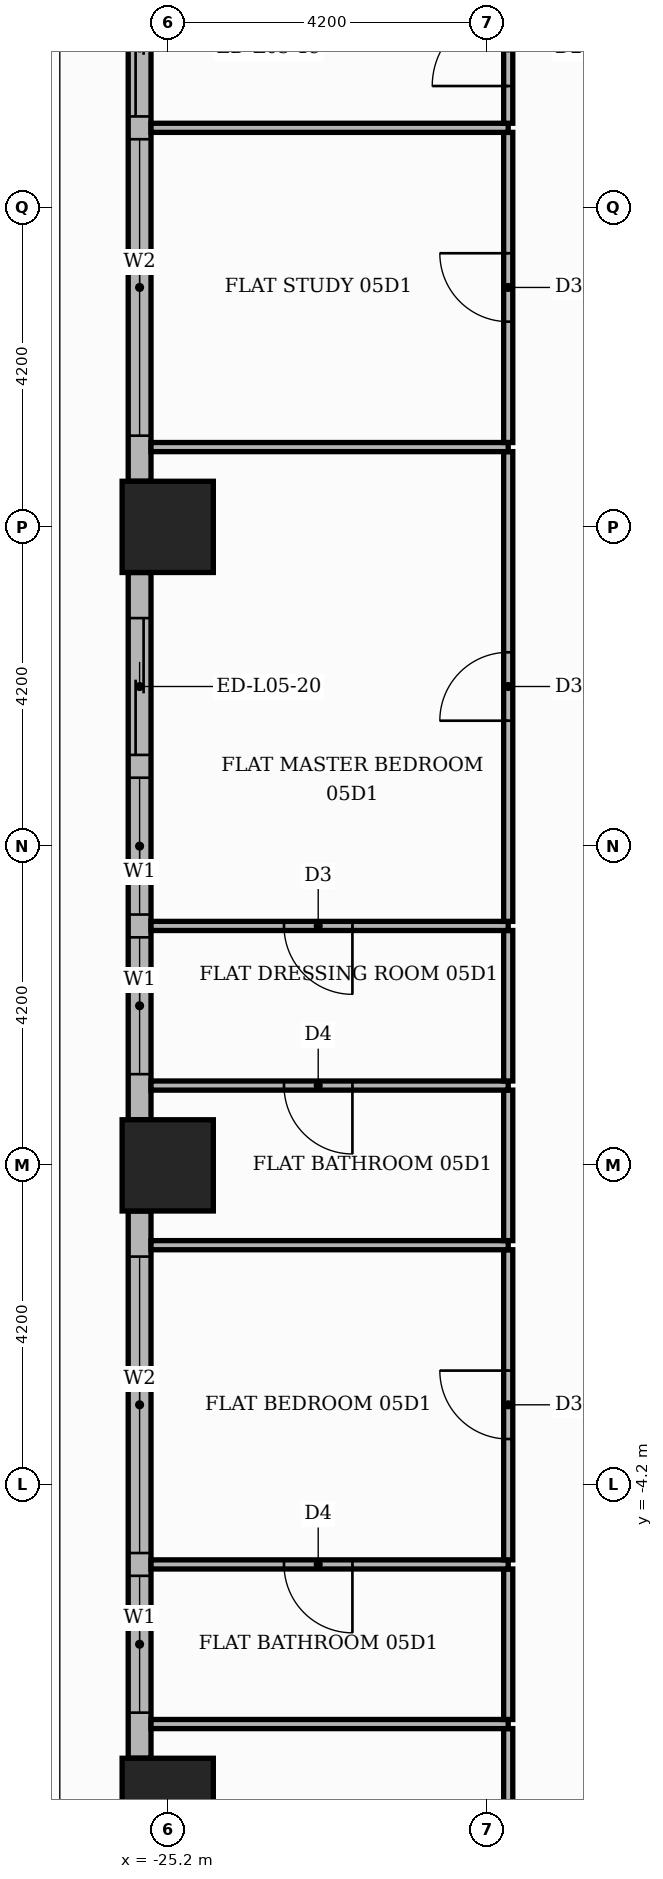
"""IFC4 building model, lengths in metres.
Left out: names, types, materials, properties, quantities, classifications, styles, units other than length and angle.
Written with IfcOpenShell. Run it as: python <this file> out.ifc"""

import sys

from ifc_helpers import new_model, si_unit, direction, frame, frame_2d, origin, origin_2d, place, context, subcontext, project, spatial, rectangle, extrude, element, fill, save


model = new_model("IFC4")
c1 = context("Model", 3, precision=1e-05, world=origin(), true_north=direction((0.0, 1.0)))
c2 = subcontext(c1, "Body", "Model", "MODEL_VIEW")
j1 = project(units=[si_unit("LENGTHUNIT", "METRE"), si_unit("PLANEANGLEUNIT", "RADIAN")], contexts=[c1])
p1 = place(None, origin())
s1 = spatial("IfcSite", under=j1, at=p1, CompositionType="ELEMENT")
p2 = place(p1, origin())
s2 = spatial("IfcBuilding", under=s1, at=p2, CompositionType="ELEMENT")
p3 = place(p2, frame((0.0, 0.0, 27.0)))
s3 = spatial("IfcBuildingStorey", under=s2, at=p3, CompositionType="ELEMENT", Elevation=27.0)
for number, where, z_axis, x_axis in (
    (1, (-25.2, 0.0, 0.0), (0.0, 0.0, 1.0), (1.0, 0.0, 0.0)),
    (2, (-25.2, -8.4, 0.0), (0.0, 0.0, 1.0), (1.0, 0.0, 0.0)),
    (3, (-25.2, 8.4, 0.0), (0.0, 0.0, 1.0), (1.0, 0.0, 0.0)),
):
    element("IfcColumn", number, at=place(p3, frame(where, z_axis=z_axis, x_axis=x_axis)), inside=s3, PredefinedType="COLUMN", context=c2, shape_type="SweptSolid", body=[
        extrude(rectangle(XDim=1.2, YDim=1.2, at=origin_2d()), origin(), (0.0, 0.0, 1.0), 3.9),
    ])
p4 = place(p3, frame((-25.57, 16.2, 0.0), z_axis=(0.0, 0.0, 1.0), x_axis=(0.0, -1.0, 0.0)))
e4 = element("IfcWall", 4, at=p4, inside=s3, PredefinedType="STANDARD", context=c2, shape_type="SweptSolid", body=[
    extrude(rectangle(XDim=7.2, YDim=0.3, at=frame_2d((3.6, 0.0))), origin(), (0.0, 0.0, 1.0), 3.48),
])
p5 = place(p4, frame((0.6, 0.0, 0.0)))
e5 = element("IfcOpeningElement", 5, at=p5, cuts=e4, PredefinedType="OPENING", context=c2, shape_type="SweptSolid", body=[
    extrude(rectangle(XDim=1.8, YDim=2.4, at=frame_2d((0.9, 1.2))), frame((0.0, 0.16, 0.0), z_axis=(0.0, -1.0, 0.0), x_axis=(1.0, 0.0, 0.0)), (0.0, 0.0, 1.0), 0.32),
])
p6 = place(p4, frame((2.7, 0.0, 0.9)))
e6 = element("IfcOpeningElement", 6, at=p6, cuts=e4, PredefinedType="OPENING", context=c2, shape_type="SweptSolid", body=[
    extrude(rectangle(XDim=3.9, YDim=2.1, at=frame_2d((1.95, 1.05))), frame((0.0, 0.16, 0.0), z_axis=(0.0, -1.0, 0.0), x_axis=(1.0, 0.0, 0.0)), (0.0, 0.0, 1.0), 0.32),
])
p7 = place(p3, frame((-25.57, 7.8, 0.0), z_axis=(0.0, 0.0, 1.0), x_axis=(0.0, -1.0, 0.0)))
e7 = element("IfcWall", 7, at=p7, inside=s3, PredefinedType="STANDARD", context=c2, shape_type="SweptSolid", body=[
    extrude(rectangle(XDim=7.2, YDim=0.3, at=frame_2d((3.6, 0.0))), origin(), (0.0, 0.0, 1.0), 3.48),
])
p8 = place(p7, frame((0.6, 0.0, 0.0)))
e8 = element("IfcOpeningElement", 8, at=p8, cuts=e7, PredefinedType="OPENING", context=c2, shape_type="SweptSolid", body=[
    extrude(rectangle(XDim=1.8, YDim=2.4, at=frame_2d((0.9, 1.2))), frame((0.0, 0.16, 0.0), z_axis=(0.0, -1.0, 0.0), x_axis=(1.0, 0.0, 0.0)), (0.0, 0.0, 1.0), 0.32),
])
p9 = place(p7, frame((2.7, 0.0, 0.9)))
e9 = element("IfcOpeningElement", 9, at=p9, cuts=e7, PredefinedType="OPENING", context=c2, shape_type="SweptSolid", body=[
    extrude(rectangle(XDim=1.8, YDim=2.1, at=frame_2d((0.9, 1.05))), frame((0.0, 0.16, 0.0), z_axis=(0.0, -1.0, 0.0), x_axis=(1.0, 0.0, 0.0)), (0.0, 0.0, 1.0), 0.32),
])
p10 = place(p7, frame((4.8, 0.0, 0.9)))
e10 = element("IfcOpeningElement", 10, at=p10, cuts=e7, PredefinedType="OPENING", context=c2, shape_type="SweptSolid", body=[
    extrude(rectangle(XDim=1.8, YDim=2.1, at=frame_2d((0.9, 1.05))), frame((0.0, 0.16, 0.0), z_axis=(0.0, -1.0, 0.0), x_axis=(1.0, 0.0, 0.0)), (0.0, 0.0, 1.0), 0.32),
])
p11 = place(p3, frame((-25.57, -0.6, 0.0), z_axis=(0.0, 0.0, 1.0), x_axis=(0.0, -1.0, 0.0)))
e11 = element("IfcWall", 11, at=p11, inside=s3, PredefinedType="STANDARD", context=c2, shape_type="SweptSolid", body=[
    extrude(rectangle(XDim=7.2, YDim=0.3, at=frame_2d((3.6, 0.0))), origin(), (0.0, 0.0, 1.0), 3.48),
])
p12 = place(p11, frame((0.6, 0.0, 0.9)))
e12 = element("IfcOpeningElement", 12, at=p12, cuts=e11, PredefinedType="OPENING", context=c2, shape_type="SweptSolid", body=[
    extrude(rectangle(XDim=3.9, YDim=2.1, at=frame_2d((1.95, 1.05))), frame((0.0, 0.16, 0.0), z_axis=(0.0, -1.0, 0.0), x_axis=(1.0, 0.0, 0.0)), (0.0, 0.0, 1.0), 0.32),
])
p13 = place(p11, frame((4.8, 0.0, 0.9)))
e13 = element("IfcOpeningElement", 13, at=p13, cuts=e11, PredefinedType="OPENING", context=c2, shape_type="SweptSolid", body=[
    extrude(rectangle(XDim=1.8, YDim=2.1, at=frame_2d((0.9, 1.05))), frame((0.0, 0.16, 0.0), z_axis=(0.0, -1.0, 0.0), x_axis=(1.0, 0.0, 0.0)), (0.0, 0.0, 1.0), 0.32),
])
p14 = place(p3, frame((-20.72, -11.49, 0.0), z_axis=(0.0, 0.0, 1.0), x_axis=(0.0, 1.0, 0.0)))
e14 = element("IfcWall", 14, at=p14, inside=s3, PredefinedType="PARTITIONING", context=c2, shape_type="SweptSolid", body=[
    extrude(rectangle(XDim=4.08, YDim=0.12, at=frame_2d((2.04, 0.0))), origin(), (0.0, 0.0, 1.0), 3.48),
])
p15 = place(p14, frame((1.59, 0.0, 0.0)))
e15 = element("IfcOpeningElement", 15, at=p15, cuts=e14, PredefinedType="OPENING", context=c2, shape_type="SweptSolid", body=[
    extrude(rectangle(XDim=0.9, YDim=2.1, at=frame_2d((0.45, 1.05))), frame((0.0, 0.07, 0.0), z_axis=(0.0, -1.0, 0.0), x_axis=(1.0, 0.0, 0.0)), (0.0, 0.0, 1.0), 0.14),
])
p16 = place(p3, frame((-25.42, -7.35, 0.0), z_axis=(0.0, 0.0, 1.0), x_axis=(1.0, 0.0, 0.0)))
e16 = element("IfcWall", 16, at=p16, inside=s3, PredefinedType="PARTITIONING", context=c2, shape_type="SweptSolid", body=[
    extrude(rectangle(XDim=4.7, YDim=0.12, at=frame_2d((2.35, 0.0))), origin(), (0.0, 0.0, 1.0), 3.48),
])
p17 = place(p3, frame((-20.72, -7.29, 0.0), z_axis=(0.0, 0.0, 1.0), x_axis=(0.0, 1.0, 0.0)))
e17 = element("IfcWall", 17, at=p17, inside=s3, PredefinedType="PARTITIONING", context=c2, shape_type="SweptSolid", body=[
    extrude(rectangle(XDim=1.98, YDim=0.12, at=frame_2d((0.99, 0.0))), origin(), (0.0, 0.0, 1.0), 3.48),
])
p18 = place(p3, frame((-25.42, -5.25, 0.0), z_axis=(0.0, 0.0, 1.0), x_axis=(1.0, 0.0, 0.0)))
e18 = element("IfcWall", 18, at=p18, inside=s3, PredefinedType="PARTITIONING", context=c2, shape_type="SweptSolid", body=[
    extrude(rectangle(XDim=4.7, YDim=0.12, at=frame_2d((2.35, 0.0))), origin(), (0.0, 0.0, 1.0), 3.48),
])
p19 = place(p18, frame((1.75, 0.0, 0.0)))
e19 = element("IfcOpeningElement", 19, at=p19, cuts=e18, PredefinedType="OPENING", context=c2, shape_type="SweptSolid", body=[
    extrude(rectangle(XDim=0.9, YDim=2.1, at=frame_2d((0.45, 1.05))), frame((0.0, 0.07, 0.0), z_axis=(0.0, -1.0, 0.0), x_axis=(1.0, 0.0, 0.0)), (0.0, 0.0, 1.0), 0.14),
])
p20 = place(p3, frame((-20.72, -5.19, 0.0), z_axis=(0.0, 0.0, 1.0), x_axis=(0.0, 1.0, 0.0)))
e20 = element("IfcWall", 20, at=p20, inside=s3, PredefinedType="PARTITIONING", context=c2, shape_type="SweptSolid", body=[
    extrude(rectangle(XDim=4.08, YDim=0.12, at=frame_2d((2.04, 0.0))), origin(), (0.0, 0.0, 1.0), 3.48),
])
p21 = place(p20, frame((1.59, 0.0, 0.0)))
e21 = element("IfcOpeningElement", 21, at=p21, cuts=e20, PredefinedType="OPENING", context=c2, shape_type="SweptSolid", body=[
    extrude(rectangle(XDim=0.9, YDim=2.1, at=frame_2d((0.45, 1.05))), frame((0.0, 0.07, 0.0), z_axis=(0.0, -1.0, 0.0), x_axis=(1.0, 0.0, 0.0)), (0.0, 0.0, 1.0), 0.14),
])
p22 = place(p3, frame((-25.42, -1.05, 0.0), z_axis=(0.0, 0.0, 1.0), x_axis=(1.0, 0.0, 0.0)))
e22 = element("IfcWall", 22, at=p22, inside=s3, PredefinedType="PARTITIONING", context=c2, shape_type="SweptSolid", body=[
    extrude(rectangle(XDim=4.7, YDim=0.12, at=frame_2d((2.35, 0.0))), origin(), (0.0, 0.0, 1.0), 3.48),
])
p23 = place(p3, frame((-20.72, -0.99, 0.0), z_axis=(0.0, 0.0, 1.0), x_axis=(0.0, 1.0, 0.0)))
e23 = element("IfcWall", 23, at=p23, inside=s3, PredefinedType="PARTITIONING", context=c2, shape_type="SweptSolid", body=[
    extrude(rectangle(XDim=1.98, YDim=0.12, at=frame_2d((0.99, 0.0))), origin(), (0.0, 0.0, 1.0), 3.48),
])
p24 = place(p3, frame((-25.42, 1.05, 0.0), z_axis=(0.0, 0.0, 1.0), x_axis=(1.0, 0.0, 0.0)))
e24 = element("IfcWall", 24, at=p24, inside=s3, PredefinedType="PARTITIONING", context=c2, shape_type="SweptSolid", body=[
    extrude(rectangle(XDim=4.7, YDim=0.12, at=frame_2d((2.35, 0.0))), origin(), (0.0, 0.0, 1.0), 3.48),
])
p25 = place(p24, frame((1.75, 0.0, 0.0)))
e25 = element("IfcOpeningElement", 25, at=p25, cuts=e24, PredefinedType="OPENING", context=c2, shape_type="SweptSolid", body=[
    extrude(rectangle(XDim=0.9, YDim=2.1, at=frame_2d((0.45, 1.05))), frame((0.0, 0.07, 0.0), z_axis=(0.0, -1.0, 0.0), x_axis=(1.0, 0.0, 0.0)), (0.0, 0.0, 1.0), 0.14),
])
p26 = place(p3, frame((-20.72, 1.11, 0.0), z_axis=(0.0, 0.0, 1.0), x_axis=(0.0, 1.0, 0.0)))
e26 = element("IfcWall", 26, at=p26, inside=s3, PredefinedType="PARTITIONING", context=c2, shape_type="SweptSolid", body=[
    extrude(rectangle(XDim=1.98, YDim=0.12, at=frame_2d((0.99, 0.0))), origin(), (0.0, 0.0, 1.0), 3.48),
])
p27 = place(p3, frame((-25.42, 3.15, 0.0), z_axis=(0.0, 0.0, 1.0), x_axis=(1.0, 0.0, 0.0)))
e27 = element("IfcWall", 27, at=p27, inside=s3, PredefinedType="PARTITIONING", context=c2, shape_type="SweptSolid", body=[
    extrude(rectangle(XDim=4.7, YDim=0.12, at=frame_2d((2.35, 0.0))), origin(), (0.0, 0.0, 1.0), 3.48),
])
p28 = place(p27, frame((1.75, 0.0, 0.0)))
e28 = element("IfcOpeningElement", 28, at=p28, cuts=e27, PredefinedType="OPENING", context=c2, shape_type="SweptSolid", body=[
    extrude(rectangle(XDim=0.9, YDim=2.1, at=frame_2d((0.45, 1.05))), frame((0.0, 0.07, 0.0), z_axis=(0.0, -1.0, 0.0), x_axis=(1.0, 0.0, 0.0)), (0.0, 0.0, 1.0), 0.14),
])
p29 = place(p3, frame((-20.72, 3.21, 0.0), z_axis=(0.0, 0.0, 1.0), x_axis=(0.0, 1.0, 0.0)))
e29 = element("IfcWall", 29, at=p29, inside=s3, PredefinedType="PARTITIONING", context=c2, shape_type="SweptSolid", body=[
    extrude(rectangle(XDim=6.18, YDim=0.12, at=frame_2d((3.09, 0.0))), origin(), (0.0, 0.0, 1.0), 3.48),
])
p30 = place(p29, frame((2.64, 0.0, 0.0)))
e30 = element("IfcOpeningElement", 30, at=p30, cuts=e29, PredefinedType="OPENING", context=c2, shape_type="SweptSolid", body=[
    extrude(rectangle(XDim=0.9, YDim=2.1, at=frame_2d((0.45, 1.05))), frame((0.0, 0.07, 0.0), z_axis=(0.0, -1.0, 0.0), x_axis=(1.0, 0.0, 0.0)), (0.0, 0.0, 1.0), 0.14),
])
p31 = place(p3, frame((-25.42, 9.45, 0.0), z_axis=(0.0, 0.0, 1.0), x_axis=(1.0, 0.0, 0.0)))
e31 = element("IfcWall", 31, at=p31, inside=s3, PredefinedType="PARTITIONING", context=c2, shape_type="SweptSolid", body=[
    extrude(rectangle(XDim=4.7, YDim=0.12, at=frame_2d((2.35, 0.0))), origin(), (0.0, 0.0, 1.0), 3.48),
])
p32 = place(p3, frame((-20.72, 9.51, 0.0), z_axis=(0.0, 0.0, 1.0), x_axis=(0.0, 1.0, 0.0)))
e32 = element("IfcWall", 32, at=p32, inside=s3, PredefinedType="PARTITIONING", context=c2, shape_type="SweptSolid", body=[
    extrude(rectangle(XDim=4.08, YDim=0.12, at=frame_2d((2.04, 0.0))), origin(), (0.0, 0.0, 1.0), 3.48),
])
p33 = place(p32, frame((1.59, 0.0, 0.0)))
e33 = element("IfcOpeningElement", 33, at=p33, cuts=e32, PredefinedType="OPENING", context=c2, shape_type="SweptSolid", body=[
    extrude(rectangle(XDim=0.9, YDim=2.1, at=frame_2d((0.45, 1.05))), frame((0.0, 0.07, 0.0), z_axis=(0.0, -1.0, 0.0), x_axis=(1.0, 0.0, 0.0)), (0.0, 0.0, 1.0), 0.14),
])
p34 = place(p3, frame((-25.42, 13.65, 0.0), z_axis=(0.0, 0.0, 1.0), x_axis=(1.0, 0.0, 0.0)))
e34 = element("IfcWall", 34, at=p34, inside=s3, PredefinedType="PARTITIONING", context=c2, shape_type="SweptSolid", body=[
    extrude(rectangle(XDim=4.7, YDim=0.12, at=frame_2d((2.35, 0.0))), origin(), (0.0, 0.0, 1.0), 3.48),
])
p35 = place(p3, frame((-20.72, 13.71, 0.0), z_axis=(0.0, 0.0, 1.0), x_axis=(0.0, 1.0, 0.0)))
e35 = element("IfcWall", 35, at=p35, inside=s3, PredefinedType="PARTITIONING", context=c2, shape_type="SweptSolid", body=[
    extrude(rectangle(XDim=1.98, YDim=0.12, at=frame_2d((0.99, 0.0))), origin(), (0.0, 0.0, 1.0), 3.48),
])
p36 = place(p35, frame((0.49, 0.0, 0.0)))
e36 = element("IfcOpeningElement", 36, at=p36, cuts=e35, PredefinedType="OPENING", context=c2, shape_type="SweptSolid", body=[
    extrude(rectangle(XDim=1.0, YDim=2.1, at=frame_2d((0.5, 1.05))), frame((0.0, 0.07, 0.0), z_axis=(0.0, -1.0, 0.0), x_axis=(1.0, 0.0, 0.0)), (0.0, 0.0, 1.0), 0.14),
])
p37 = place(p5, origin())
e37 = element("IfcDoor", 37, at=p37, inside=s3, OperationType="SLIDING_TO_LEFT", PredefinedType="DOOR", context=c2, shape_type="SweptSolid", body=[
    extrude(rectangle(XDim=1.8, YDim=2.4, at=frame_2d((0.9, 1.2))), frame((0.0, 0.025, 0.0), z_axis=(0.0, -1.0, 0.0), x_axis=(1.0, 0.0, 0.0)), (0.0, 0.0, 1.0), 0.05),
])
fill(e5, e37)
p38 = place(p6, origin())
e38 = element("IfcWindow", 38, at=p38, inside=s3, PartitioningType="SINGLE_PANEL", PredefinedType="WINDOW", context=c2, shape_type="SweptSolid", body=[
    extrude(rectangle(XDim=3.9, YDim=2.1, at=frame_2d((1.95, 1.05))), frame((0.0, 0.03, 0.0), z_axis=(0.0, -1.0, 0.0), x_axis=(1.0, 0.0, 0.0)), (0.0, 0.0, 1.0), 0.06),
])
fill(e6, e38)
p39 = place(p8, origin())
e39 = element("IfcDoor", 39, at=p39, inside=s3, OperationType="SLIDING_TO_LEFT", PredefinedType="DOOR", context=c2, shape_type="SweptSolid", body=[
    extrude(rectangle(XDim=1.8, YDim=2.4, at=frame_2d((0.9, 1.2))), frame((0.0, 0.025, 0.0), z_axis=(0.0, -1.0, 0.0), x_axis=(1.0, 0.0, 0.0)), (0.0, 0.0, 1.0), 0.05),
])
fill(e8, e39)
p40 = place(p9, origin())
e40 = element("IfcWindow", 40, at=p40, inside=s3, PartitioningType="SINGLE_PANEL", PredefinedType="WINDOW", context=c2, shape_type="SweptSolid", body=[
    extrude(rectangle(XDim=1.8, YDim=2.1, at=frame_2d((0.9, 1.05))), frame((0.0, 0.03, 0.0), z_axis=(0.0, -1.0, 0.0), x_axis=(1.0, 0.0, 0.0)), (0.0, 0.0, 1.0), 0.06),
])
fill(e9, e40)
p41 = place(p10, origin())
e41 = element("IfcWindow", 41, at=p41, inside=s3, PartitioningType="SINGLE_PANEL", PredefinedType="WINDOW", context=c2, shape_type="SweptSolid", body=[
    extrude(rectangle(XDim=1.8, YDim=2.1, at=frame_2d((0.9, 1.05))), frame((0.0, 0.03, 0.0), z_axis=(0.0, -1.0, 0.0), x_axis=(1.0, 0.0, 0.0)), (0.0, 0.0, 1.0), 0.06),
])
fill(e10, e41)
p42 = place(p12, origin())
e42 = element("IfcWindow", 42, at=p42, inside=s3, PartitioningType="SINGLE_PANEL", PredefinedType="WINDOW", context=c2, shape_type="SweptSolid", body=[
    extrude(rectangle(XDim=3.9, YDim=2.1, at=frame_2d((1.95, 1.05))), frame((0.0, 0.03, 0.0), z_axis=(0.0, -1.0, 0.0), x_axis=(1.0, 0.0, 0.0)), (0.0, 0.0, 1.0), 0.06),
])
fill(e12, e42)
p43 = place(p13, origin())
e43 = element("IfcWindow", 43, at=p43, inside=s3, PartitioningType="SINGLE_PANEL", PredefinedType="WINDOW", context=c2, shape_type="SweptSolid", body=[
    extrude(rectangle(XDim=1.8, YDim=2.1, at=frame_2d((0.9, 1.05))), frame((0.0, 0.03, 0.0), z_axis=(0.0, -1.0, 0.0), x_axis=(1.0, 0.0, 0.0)), (0.0, 0.0, 1.0), 0.06),
])
fill(e13, e43)
p44 = place(p36, origin())
e44 = element("IfcDoor", 44, at=p44, inside=s3, OperationType="SINGLE_SWING_LEFT", PredefinedType="DOOR", context=c2, shape_type="SweptSolid", body=[
    extrude(rectangle(XDim=1.0, YDim=2.1, at=frame_2d((0.5, 1.05))), frame((0.0, 0.025, 0.0), z_axis=(0.0, -1.0, 0.0), x_axis=(1.0, 0.0, 0.0)), (0.0, 0.0, 1.0), 0.05),
])
fill(e36, e44)
p45 = place(p33, origin())
e45 = element("IfcDoor", 45, at=p45, inside=s3, OperationType="SINGLE_SWING_RIGHT", PredefinedType="DOOR", context=c2, shape_type="SweptSolid", body=[
    extrude(rectangle(XDim=0.9, YDim=2.1, at=frame_2d((0.45, 1.05))), frame((0.0, 0.025, 0.0), z_axis=(0.0, -1.0, 0.0), x_axis=(1.0, 0.0, 0.0)), (0.0, 0.0, 1.0), 0.05),
])
fill(e33, e45)
p46 = place(p30, origin())
e46 = element("IfcDoor", 46, at=p46, inside=s3, OperationType="SINGLE_SWING_LEFT", PredefinedType="DOOR", context=c2, shape_type="SweptSolid", body=[
    extrude(rectangle(XDim=0.9, YDim=2.1, at=frame_2d((0.45, 1.05))), frame((0.0, 0.025, 0.0), z_axis=(0.0, -1.0, 0.0), x_axis=(1.0, 0.0, 0.0)), (0.0, 0.0, 1.0), 0.05),
])
fill(e30, e46)
p47 = place(p28, frame((0.9, 0.0, 0.0), z_axis=(0.0, 0.0, 1.0), x_axis=(-1.0, 0.0, 0.0)))
e47 = element("IfcDoor", 47, at=p47, inside=s3, OperationType="SINGLE_SWING_RIGHT", PredefinedType="DOOR", context=c2, shape_type="SweptSolid", body=[
    extrude(rectangle(XDim=0.9, YDim=2.1, at=frame_2d((0.45, 1.05))), frame((0.0, 0.025, 0.0), z_axis=(0.0, -1.0, 0.0), x_axis=(1.0, 0.0, 0.0)), (0.0, 0.0, 1.0), 0.05),
])
fill(e28, e47)
p48 = place(p25, frame((0.9, 0.0, 0.0), z_axis=(0.0, 0.0, 1.0), x_axis=(-1.0, 0.0, 0.0)))
e48 = element("IfcDoor", 48, at=p48, inside=s3, OperationType="SINGLE_SWING_RIGHT", PredefinedType="DOOR", context=c2, shape_type="SweptSolid", body=[
    extrude(rectangle(XDim=0.9, YDim=2.1, at=frame_2d((0.45, 1.05))), frame((0.0, 0.025, 0.0), z_axis=(0.0, -1.0, 0.0), x_axis=(1.0, 0.0, 0.0)), (0.0, 0.0, 1.0), 0.05),
])
fill(e25, e48)
p49 = place(p21, origin())
e49 = element("IfcDoor", 49, at=p49, inside=s3, OperationType="SINGLE_SWING_RIGHT", PredefinedType="DOOR", context=c2, shape_type="SweptSolid", body=[
    extrude(rectangle(XDim=0.9, YDim=2.1, at=frame_2d((0.45, 1.05))), frame((0.0, 0.025, 0.0), z_axis=(0.0, -1.0, 0.0), x_axis=(1.0, 0.0, 0.0)), (0.0, 0.0, 1.0), 0.05),
])
fill(e21, e49)
p50 = place(p19, frame((0.9, 0.0, 0.0), z_axis=(0.0, 0.0, 1.0), x_axis=(-1.0, 0.0, 0.0)))
e50 = element("IfcDoor", 50, at=p50, inside=s3, OperationType="SINGLE_SWING_RIGHT", PredefinedType="DOOR", context=c2, shape_type="SweptSolid", body=[
    extrude(rectangle(XDim=0.9, YDim=2.1, at=frame_2d((0.45, 1.05))), frame((0.0, 0.025, 0.0), z_axis=(0.0, -1.0, 0.0), x_axis=(1.0, 0.0, 0.0)), (0.0, 0.0, 1.0), 0.05),
])
fill(e19, e50)
save(model, sys.argv[1])
